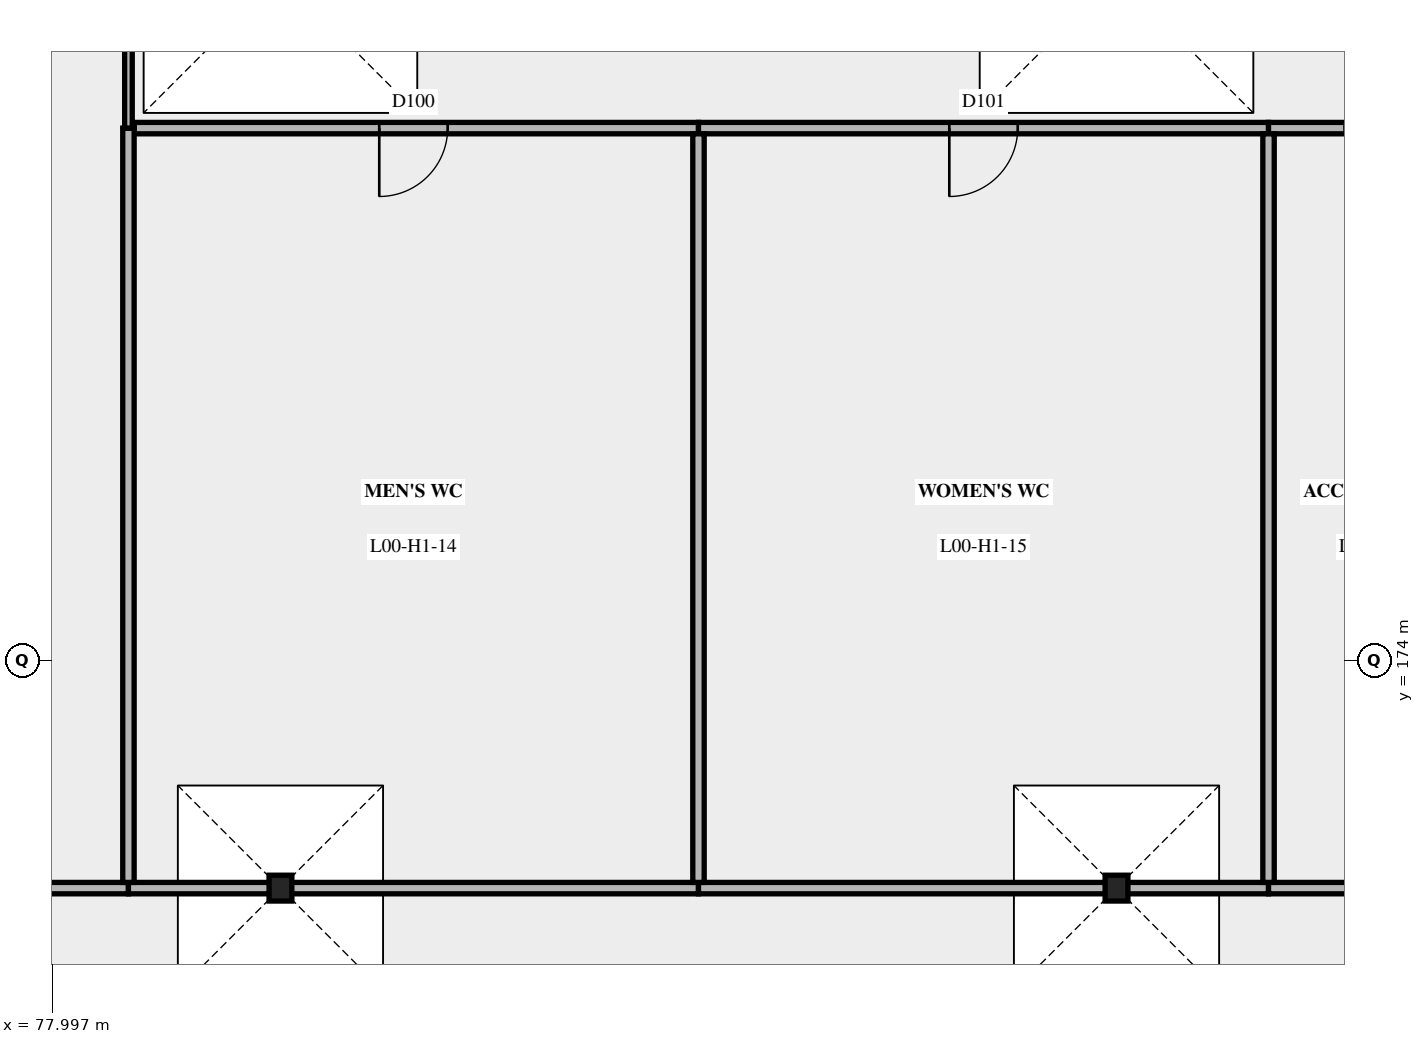
"""IFC4 building model, lengths in metres.
Left out: names, types, materials, properties, quantities, classifications, styles, units other than length and angle.
Written with IfcOpenShell. Run it as: python <this file> out.ifc"""

import sys

from ifc_helpers import new_model, si_unit, direction, frame, frame_2d, origin, origin_2d, place, context, subcontext, project, spatial, rectangle, i_section, extrude, element, fill, save


model = new_model("IFC4")
c1 = context("Model", 3, precision=1e-05, world=origin(), true_north=direction((0.0, 1.0)))
c2 = subcontext(c1, "Body", "Model", "MODEL_VIEW")
j1 = project(units=[si_unit("LENGTHUNIT", "METRE"), si_unit("PLANEANGLEUNIT", "RADIAN")], contexts=[c1])
p1 = place(None, origin())
s1 = spatial("IfcSite", under=j1, at=p1, CompositionType="ELEMENT")
p2 = place(p1, origin())
s2 = spatial("IfcBuilding", under=s1, at=p2, CompositionType="ELEMENT")
p3 = place(p2, origin())
s3 = spatial("IfcBuildingStorey", under=s2, at=p3, CompositionType="ELEMENT", Elevation=0.0)
for number, where, z_axis, x_axis in (
    (1, (81.0, 171.0, 0.0), (0.0, 0.0, 1.0), (1.0, 0.0, 0.0)),
    (2, (92.0, 171.0, 0.0), (0.0, 0.0, 1.0), (1.0, 0.0, 0.0)),
):
    element("IfcColumn", number, at=place(p3, frame(where, z_axis=z_axis, x_axis=x_axis)), inside=s3, PredefinedType="COLUMN", context=c2, shape_type="SweptSolid", body=[
        extrude(i_section(OverallWidth=0.3, OverallDepth=0.34, WebThickness=0.012, FlangeThickness=0.021, at=origin_2d()), origin(), (0.0, 0.0, 1.0), 4.65),
    ])
p4 = place(p3, frame((61.0, 171.0, 0.0), z_axis=(0.0, 0.0, 1.0), x_axis=(1.0, 0.0, 0.0)))
e3 = element("IfcWall", 3, at=p4, inside=s3, PredefinedType="PARTITIONING", context=c2, shape_type="SweptSolid", body=[
    extrude(rectangle(XDim=18.0, YDim=0.15, at=frame_2d((9.0, 0.0))), origin(), (0.0, 0.0, 1.0), 4.65),
])
p5 = place(p4, frame((2.3, 0.0, 0.0)))
e4 = element("IfcOpeningElement", 4, at=p5, cuts=e3, PredefinedType="OPENING", context=c2, shape_type="SweptSolid", body=[
    extrude(rectangle(XDim=2.4, YDim=2.4, at=frame_2d((1.2, 1.2))), frame((0.0, 0.085, 0.0), z_axis=(0.0, -1.0, 0.0), x_axis=(1.0, 0.0, 0.0)), (0.0, 0.0, 1.0), 0.17),
])
p6 = place(p4, frame((13.3, 0.0, 0.0)))
e5 = element("IfcOpeningElement", 5, at=p6, cuts=e3, PredefinedType="OPENING", context=c2, shape_type="SweptSolid", body=[
    extrude(rectangle(XDim=2.4, YDim=2.4, at=frame_2d((1.2, 1.2))), frame((0.0, 0.085, 0.0), z_axis=(0.0, -1.0, 0.0), x_axis=(1.0, 0.0, 0.0)), (0.0, 0.0, 1.0), 0.17),
])
for number, where, z_axis, x_axis in (
    (6, (79.0, 171.0, 0.0), (0.0, 0.0, 1.0), (1.0, 0.0, 0.0)),
    (7, (86.5, 171.0, 0.0), (0.0, 0.0, 1.0), (1.0, 0.0, 0.0)),
):
    element("IfcWall", number, at=place(p3, frame(where, z_axis=z_axis, x_axis=x_axis)), inside=s3, PredefinedType="PARTITIONING", context=c2, shape_type="SweptSolid", body=[
        extrude(rectangle(XDim=7.5, YDim=0.15, at=frame_2d((3.75, 0.0))), origin(), (0.0, 0.0, 1.0), 4.65),
    ])
p7 = place(p3, frame((94.0, 171.0, 0.0), z_axis=(0.0, 0.0, 1.0), x_axis=(1.0, 0.0, 0.0)))
e8 = element("IfcWall", 8, at=p7, inside=s3, PredefinedType="PARTITIONING", context=c2, shape_type="SweptSolid", body=[
    extrude(rectangle(XDim=3.0, YDim=0.15, at=frame_2d((1.5, 0.0))), origin(), (0.0, 0.0, 1.0), 4.65),
])
p8 = place(p3, frame((79.075, 181.0, 0.0), z_axis=(0.0, 0.0, 1.0), x_axis=(1.0, 0.0, 0.0)))
e9 = element("IfcWall", 9, at=p8, inside=s3, PredefinedType="PARTITIONING", context=c2, shape_type="SweptSolid", body=[
    extrude(rectangle(XDim=7.425, YDim=0.15, at=frame_2d((3.712, 0.0))), origin(), (0.0, 0.0, 1.0), 5.15),
])
p9 = place(p8, frame((3.225, 0.0, 0.0)))
e10 = element("IfcOpeningElement", 10, at=p9, cuts=e9, PredefinedType="OPENING", context=c2, shape_type="SweptSolid", body=[
    extrude(rectangle(XDim=0.9, YDim=2.1, at=frame_2d((0.45, 1.05))), frame((0.0, 0.085, 0.0), z_axis=(0.0, -1.0, 0.0), x_axis=(1.0, 0.0, 0.0)), (0.0, 0.0, 1.0), 0.17),
])
p10 = place(p3, frame((86.5, 181.0, 0.0), z_axis=(0.0, 0.0, 1.0), x_axis=(1.0, 0.0, 0.0)))
e11 = element("IfcWall", 11, at=p10, inside=s3, PredefinedType="PARTITIONING", context=c2, shape_type="SweptSolid", body=[
    extrude(rectangle(XDim=7.5, YDim=0.15, at=frame_2d((3.75, 0.0))), origin(), (0.0, 0.0, 1.0), 5.15),
])
p11 = place(p10, frame((3.3, 0.0, 0.0)))
e12 = element("IfcOpeningElement", 12, at=p11, cuts=e11, PredefinedType="OPENING", context=c2, shape_type="SweptSolid", body=[
    extrude(rectangle(XDim=0.9, YDim=2.1, at=frame_2d((0.45, 1.05))), frame((0.0, 0.085, 0.0), z_axis=(0.0, -1.0, 0.0), x_axis=(1.0, 0.0, 0.0)), (0.0, 0.0, 1.0), 0.17),
])
p12 = place(p3, frame((94.0, 181.0, 0.0), z_axis=(0.0, 0.0, 1.0), x_axis=(1.0, 0.0, 0.0)))
e13 = element("IfcWall", 13, at=p12, inside=s3, PredefinedType="PARTITIONING", context=c2, shape_type="SweptSolid", body=[
    extrude(rectangle(XDim=3.0, YDim=0.15, at=frame_2d((1.5, 0.0))), origin(), (0.0, 0.0, 1.0), 5.15),
])
p13 = place(p12, frame((1.0, 0.0, 0.0)))
e14 = element("IfcOpeningElement", 14, at=p13, cuts=e13, PredefinedType="OPENING", context=c2, shape_type="SweptSolid", body=[
    extrude(rectangle(XDim=1.0, YDim=2.1, at=frame_2d((0.5, 1.05))), frame((0.0, 0.085, 0.0), z_axis=(0.0, -1.0, 0.0), x_axis=(1.0, 0.0, 0.0)), (0.0, 0.0, 1.0), 0.17),
])
p14 = place(p3, frame((79.0, 171.075, 0.0), z_axis=(0.0, 0.0, 1.0), x_axis=(0.0, 1.0, 0.0)))
e15 = element("IfcWall", 15, at=p14, inside=s3, PredefinedType="PARTITIONING", context=c2, shape_type="SweptSolid", body=[
    extrude(rectangle(XDim=9.925, YDim=0.15, at=frame_2d((4.962, 0.0))), origin(), (0.0, 0.0, 1.0), 5.15),
])
p15 = place(p3, frame((79.0, 181.0, 0.0), z_axis=(0.0, 0.0, 1.0), x_axis=(0.0, 1.0, 0.0)))
e16 = element("IfcWall", 16, at=p15, inside=s3, PredefinedType="PARTITIONING", context=c2, shape_type="SweptSolid", body=[
    extrude(rectangle(XDim=6.0, YDim=0.1, at=frame_2d((3.0, 0.0))), origin(), (0.0, 0.0, 1.0), 5.15),
])
p16 = place(p15, frame((2.1, 0.0, 0.0)))
e17 = element("IfcOpeningElement", 17, at=p16, cuts=e16, PredefinedType="OPENING", context=c2, shape_type="SweptSolid", body=[
    extrude(rectangle(XDim=1.8, YDim=2.1, at=frame_2d((0.9, 1.05))), frame((0.0, 0.06, 0.0), z_axis=(0.0, -1.0, 0.0), x_axis=(1.0, 0.0, 0.0)), (0.0, 0.0, 1.0), 0.12),
])
p17 = place(p3, frame((86.5, 171.075, 0.0), z_axis=(0.0, 0.0, 1.0), x_axis=(0.0, 1.0, 0.0)))
e18 = element("IfcWall", 18, at=p17, inside=s3, PredefinedType="PARTITIONING", context=c2, shape_type="SweptSolid", body=[
    extrude(rectangle(XDim=9.85, YDim=0.15, at=frame_2d((4.925, 0.0))), origin(), (0.0, 0.0, 1.0), 4.75),
])
p18 = place(p3, frame((94.0, 171.075, 0.0), z_axis=(0.0, 0.0, 1.0), x_axis=(0.0, 1.0, 0.0)))
e19 = element("IfcWall", 19, at=p18, inside=s3, PredefinedType="PARTITIONING", context=c2, shape_type="SweptSolid", body=[
    extrude(rectangle(XDim=9.85, YDim=0.15, at=frame_2d((4.925, 0.0))), origin(), (0.0, 0.0, 1.0), 5.15),
])
p19 = place(p9, origin())
e20 = element("IfcDoor", 20, at=p19, inside=s3, OperationType="SINGLE_SWING_RIGHT", PredefinedType="DOOR", context=c2, shape_type="SweptSolid", body=[
    extrude(rectangle(XDim=0.9, YDim=2.1, at=frame_2d((0.45, 1.05))), frame((0.0, 0.025, 0.0), z_axis=(0.0, -1.0, 0.0), x_axis=(1.0, 0.0, 0.0)), (0.0, 0.0, 1.0), 0.05),
])
fill(e10, e20)
p20 = place(p11, origin())
e21 = element("IfcDoor", 21, at=p20, inside=s3, OperationType="SINGLE_SWING_RIGHT", PredefinedType="DOOR", context=c2, shape_type="SweptSolid", body=[
    extrude(rectangle(XDim=0.9, YDim=2.1, at=frame_2d((0.45, 1.05))), frame((0.0, 0.025, 0.0), z_axis=(0.0, -1.0, 0.0), x_axis=(1.0, 0.0, 0.0)), (0.0, 0.0, 1.0), 0.05),
])
fill(e12, e21)
save(model, sys.argv[1])
